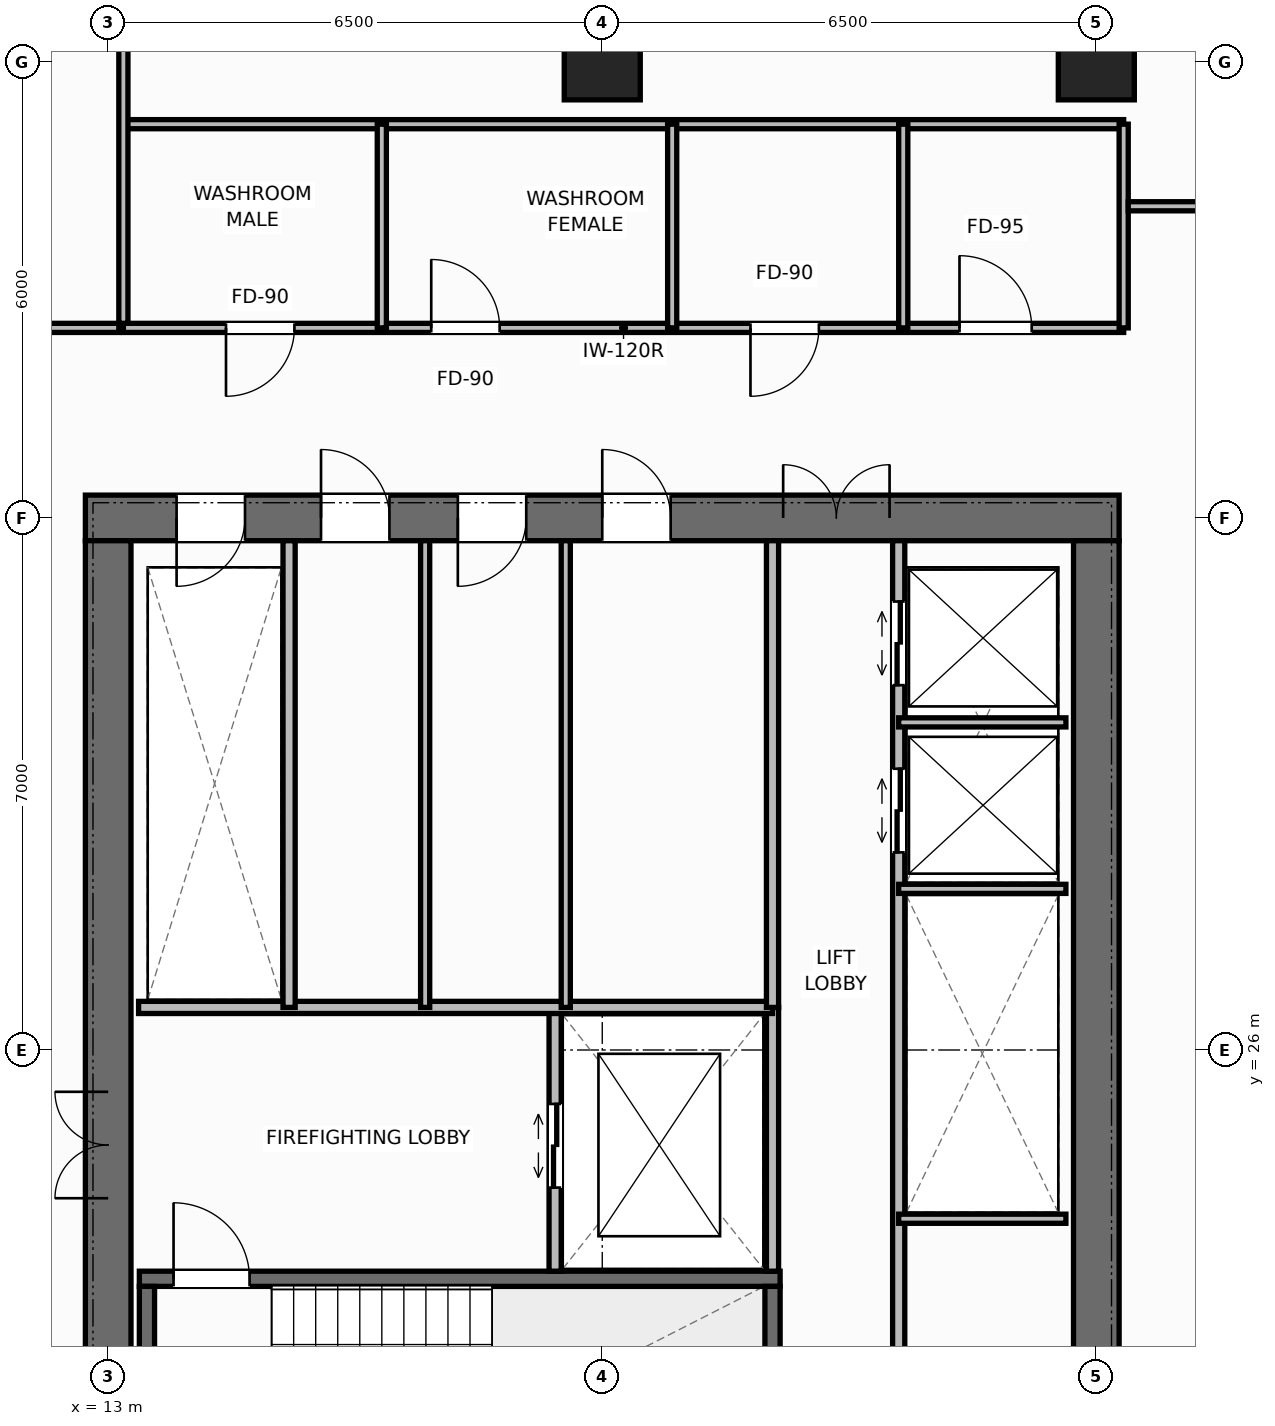
"""IFC4 building model, lengths in metres.
Left out: names, types, materials, properties, quantities, classifications, styles, units other than length and angle.
Written with IfcOpenShell. Run it as: python <this file> out.ifc"""

import sys

from ifc_helpers import new_model, si_unit, direction, frame, frame_2d, origin, origin_2d, place, context, subcontext, project, spatial, rectangle, extrude, element, fill, save


model = new_model("IFC4")
c1 = context("Model", 3, precision=1e-05, world=origin(), true_north=direction((0.0, 1.0)))
c2 = subcontext(c1, "Body", "Model", "MODEL_VIEW")
j1 = project(units=[si_unit("LENGTHUNIT", "METRE"), si_unit("PLANEANGLEUNIT", "RADIAN")], contexts=[c1])
p1 = place(None, origin())
s1 = spatial("IfcSite", under=j1, at=p1, CompositionType="ELEMENT")
p2 = place(p1, origin())
s2 = spatial("IfcBuilding", under=s1, at=p2, CompositionType="ELEMENT")
p3 = place(p2, frame((0.0, 0.0, 148.0)))
s3 = spatial("IfcBuildingStorey", under=s2, at=p3, CompositionType="ELEMENT", Elevation=148.0)
p4 = place(p3, frame((12.7, 33.0, 0.0), z_axis=(0.0, 0.0, 1.0), x_axis=(1.0, 0.0, 0.0)))
e1 = element("IfcWall", 1, at=p4, inside=s3, PredefinedType="SHEAR", context=c2, shape_type="SweptSolid", body=[
    extrude(rectangle(XDim=13.6, YDim=0.6, at=frame_2d((6.8, 0.0))), origin(), (0.0, 0.0, 1.0), 3.8),
])
p5 = place(p4, frame((1.2, 0.0, 0.0)))
e2 = element("IfcOpeningElement", 2, at=p5, cuts=e1, PredefinedType="OPENING", context=c2, shape_type="SweptSolid", body=[
    extrude(rectangle(XDim=0.9, YDim=2.15, at=frame_2d((0.45, 1.075))), frame((0.0, 0.31, 0.0), z_axis=(0.0, -1.0, 0.0), x_axis=(1.0, 0.0, 0.0)), (0.0, 0.0, 1.0), 0.62),
])
p6 = place(p4, frame((3.1, 0.0, 0.0)))
e3 = element("IfcOpeningElement", 3, at=p6, cuts=e1, PredefinedType="OPENING", context=c2, shape_type="SweptSolid", body=[
    extrude(rectangle(XDim=0.9, YDim=2.15, at=frame_2d((0.45, 1.075))), frame((0.0, 0.31, 0.0), z_axis=(0.0, -1.0, 0.0), x_axis=(1.0, 0.0, 0.0)), (0.0, 0.0, 1.0), 0.62),
])
p7 = place(p4, frame((4.9, 0.0, 0.0)))
e4 = element("IfcOpeningElement", 4, at=p7, cuts=e1, PredefinedType="OPENING", context=c2, shape_type="SweptSolid", body=[
    extrude(rectangle(XDim=0.9, YDim=2.15, at=frame_2d((0.45, 1.075))), frame((0.0, 0.31, 0.0), z_axis=(0.0, -1.0, 0.0), x_axis=(1.0, 0.0, 0.0)), (0.0, 0.0, 1.0), 0.62),
])
p8 = place(p4, frame((6.8, 0.0, 0.0)))
e5 = element("IfcOpeningElement", 5, at=p8, cuts=e1, PredefinedType="OPENING", context=c2, shape_type="SweptSolid", body=[
    extrude(rectangle(XDim=0.9, YDim=2.15, at=frame_2d((0.45, 1.075))), frame((0.0, 0.31, 0.0), z_axis=(0.0, -1.0, 0.0), x_axis=(1.0, 0.0, 0.0)), (0.0, 0.0, 1.0), 0.62),
])
p9 = place(p4, frame((9.18, 0.0, 0.0)))
e6 = element("IfcOpeningElement", 6, at=p9, cuts=e1, PredefinedType="OPENING", context=c2, shape_type="SweptSolid", body=[
    extrude(rectangle(XDim=1.4, YDim=2.2, at=frame_2d((0.7, 1.1))), frame((0.0, 0.31, 0.0), z_axis=(0.0, -1.0, 0.0), x_axis=(1.0, 0.0, 0.0)), (0.0, 0.0, 1.0), 0.62),
])
p10 = place(p3, frame((13.0, 19.3, 0.0), z_axis=(0.0, 0.0, 1.0), x_axis=(0.0, 1.0, 0.0)))
e7 = element("IfcWall", 7, at=p10, inside=s3, PredefinedType="SHEAR", context=c2, shape_type="SweptSolid", body=[
    extrude(rectangle(XDim=13.4, YDim=0.6, at=frame_2d((6.7, 0.0))), origin(), (0.0, 0.0, 1.0), 3.8),
])
p11 = place(p10, frame((4.75, 0.0, 0.0)))
e8 = element("IfcOpeningElement", 8, at=p11, cuts=e7, PredefinedType="OPENING", context=c2, shape_type="SweptSolid", body=[
    extrude(rectangle(XDim=1.4, YDim=2.2, at=frame_2d((0.7, 1.1))), frame((0.0, 0.31, 0.0), z_axis=(0.0, -1.0, 0.0), x_axis=(1.0, 0.0, 0.0)), (0.0, 0.0, 1.0), 0.62),
])
p12 = place(p3, frame((26.0, 19.3, 0.0), z_axis=(0.0, 0.0, 1.0), x_axis=(0.0, 1.0, 0.0)))
e9 = element("IfcWall", 9, at=p12, inside=s3, PredefinedType="SHEAR", context=c2, shape_type="SweptSolid", body=[
    extrude(rectangle(XDim=13.4, YDim=0.6, at=frame_2d((6.7, 0.0))), origin(), (0.0, 0.0, 1.0), 3.8),
])
p13 = place(p3, frame((13.41, 22.99, 0.0), z_axis=(0.0, 0.0, 1.0), x_axis=(1.0, 0.0, 0.0)))
e10 = element("IfcWall", 10, at=p13, inside=s3, PredefinedType="SHEAR", context=c2, shape_type="SweptSolid", body=[
    extrude(rectangle(XDim=8.43, YDim=0.2, at=frame_2d((4.215, 0.0))), origin(), (0.0, 0.0, 1.0), 3.8),
])
p14 = place(p13, frame((0.45, 0.0, 0.0)))
e11 = element("IfcOpeningElement", 11, at=p14, cuts=e10, PredefinedType="OPENING", context=c2, shape_type="SweptSolid", body=[
    extrude(rectangle(XDim=1.0, YDim=2.15, at=frame_2d((0.5, 1.075))), frame((0.0, 0.11, 0.0), z_axis=(0.0, -1.0, 0.0), x_axis=(1.0, 0.0, 0.0)), (0.0, 0.0, 1.0), 0.22),
])
for number, where, z_axis, x_axis in (
    (12, (13.51, 19.61, 0.0), (0.0, 0.0, 1.0), (0.0, 1.0, 0.0)),
    (13, (21.74, 19.61, 0.0), (0.0, 0.0, 1.0), (0.0, 1.0, 0.0)),
):
    element("IfcWall", number, at=place(p3, frame(where, z_axis=z_axis, x_axis=x_axis)), inside=s3, PredefinedType="SHEAR", context=c2, shape_type="SweptSolid", body=[
        extrude(rectangle(XDim=3.28, YDim=0.2, at=frame_2d((1.64, 0.0))), origin(), (0.0, 0.0, 1.0), 3.8),
    ])
for number, where, z_axis, x_axis in (
    (14, (19.5, 39.0, 0.0), (0.0, 0.0, 1.0), (1.0, 0.0, 0.0)),
    (15, (26.0, 39.0, 0.0), (0.0, 0.0, 1.0), (1.0, 0.0, 0.0)),
):
    element("IfcColumn", number, at=place(p3, frame(where, z_axis=z_axis, x_axis=x_axis)), inside=s3, PredefinedType="COLUMN", context=c2, shape_type="SweptSolid", body=[
        extrude(rectangle(XDim=1.0, YDim=1.0, at=origin_2d()), origin(), (0.0, 0.0, 1.0), 3.8),
    ])
p15 = place(p3, frame((21.74, 23.09, 0.0), z_axis=(0.0, 0.0, 1.0), x_axis=(0.0, 1.0, 0.0)))
e16 = element("IfcWall", 16, at=p15, inside=s3, PredefinedType="STANDARD", context=c2, shape_type="SweptSolid", body=[
    extrude(rectangle(XDim=3.47, YDim=0.16, at=frame_2d((1.735, 0.0))), origin(), (0.0, 0.0, 1.0), 3.572),
])
p16 = place(p3, frame((18.88, 23.09, 0.0), z_axis=(0.0, 0.0, 1.0), x_axis=(0.0, 1.0, 0.0)))
e17 = element("IfcWall", 17, at=p16, inside=s3, PredefinedType="STANDARD", context=c2, shape_type="SweptSolid", body=[
    extrude(rectangle(XDim=3.47, YDim=0.16, at=frame_2d((1.735, 0.0))), origin(), (0.0, 0.0, 1.0), 3.572),
])
p17 = place(p16, frame((1.1, 0.0, 0.0)))
e18 = element("IfcOpeningElement", 18, at=p17, cuts=e17, PredefinedType="OPENING", context=c2, shape_type="SweptSolid", body=[
    extrude(rectangle(XDim=1.1, YDim=2.2, at=frame_2d((0.55, 1.1))), frame((0.0, 0.09, 0.0), z_axis=(0.0, -1.0, 0.0), x_axis=(1.0, 0.0, 0.0)), (0.0, 0.0, 1.0), 0.18),
])
p18 = place(p3, frame((13.4, 26.56, 0.0), z_axis=(0.0, 0.0, 1.0), x_axis=(1.0, 0.0, 0.0)))
e19 = element("IfcWall", 19, at=p18, inside=s3, PredefinedType="STANDARD", context=c2, shape_type="SweptSolid", body=[
    extrude(rectangle(XDim=8.34, YDim=0.16, at=frame_2d((4.17, 0.0))), origin(), (0.0, 0.0, 1.0), 3.572),
])
p19 = place(p3, frame((15.38, 26.56, 0.0), z_axis=(0.0, 0.0, 1.0), x_axis=(0.0, 1.0, 0.0)))
e20 = element("IfcWall", 20, at=p19, inside=s3, PredefinedType="STANDARD", context=c2, shape_type="SweptSolid", body=[
    extrude(rectangle(XDim=6.14, YDim=0.16, at=frame_2d((3.07, 0.0))), origin(), (0.0, 0.0, 1.0), 3.572),
])
for number, where, z_axis, x_axis in (
    (21, (17.17, 26.56, 0.0), (0.0, 0.0, 1.0), (0.0, 1.0, 0.0)),
    (22, (19.02, 26.56, 0.0), (0.0, 0.0, 1.0), (0.0, 1.0, 0.0)),
):
    element("IfcWall", number, at=place(p3, frame(where, z_axis=z_axis, x_axis=x_axis)), inside=s3, PredefinedType="PARTITIONING", context=c2, shape_type="SweptSolid", body=[
        extrude(rectangle(XDim=6.14, YDim=0.12, at=frame_2d((3.07, 0.0))), origin(), (0.0, 0.0, 1.0), 3.572),
    ])
p20 = place(p3, frame((21.74, 26.56, 0.0), z_axis=(0.0, 0.0, 1.0), x_axis=(0.0, 1.0, 0.0)))
e23 = element("IfcWall", 23, at=p20, inside=s3, PredefinedType="STANDARD", context=c2, shape_type="SweptSolid", body=[
    extrude(rectangle(XDim=6.14, YDim=0.16, at=frame_2d((3.07, 0.0))), origin(), (0.0, 0.0, 1.0), 3.572),
])
p21 = place(p3, frame((23.4, 19.3, 0.0), z_axis=(0.0, 0.0, 1.0), x_axis=(0.0, 1.0, 0.0)))
e24 = element("IfcWall", 24, at=p21, inside=s3, PredefinedType="STANDARD", context=c2, shape_type="SweptSolid", body=[
    extrude(rectangle(XDim=13.4, YDim=0.16, at=frame_2d((6.7, 0.0))), origin(), (0.0, 0.0, 1.0), 3.572),
])
p22 = place(p21, frame((1.7, 0.0, 0.0)))
e25 = element("IfcOpeningElement", 25, at=p22, cuts=e24, PredefinedType="OPENING", context=c2, shape_type="SweptSolid", body=[
    extrude(rectangle(XDim=0.95, YDim=2.15, at=frame_2d((0.475, 1.075))), frame((0.0, 0.09, 0.0), z_axis=(0.0, -1.0, 0.0), x_axis=(1.0, 0.0, 0.0)), (0.0, 0.0, 1.0), 0.18),
])
p23 = place(p21, frame((9.3, 0.0, 0.0)))
e26 = element("IfcOpeningElement", 26, at=p23, cuts=e24, PredefinedType="OPENING", context=c2, shape_type="SweptSolid", body=[
    extrude(rectangle(XDim=1.1, YDim=2.2, at=frame_2d((0.55, 1.1))), frame((0.0, 0.09, 0.0), z_axis=(0.0, -1.0, 0.0), x_axis=(1.0, 0.0, 0.0)), (0.0, 0.0, 1.0), 0.18),
])
p24 = place(p21, frame((11.5, 0.0, 0.0)))
e27 = element("IfcOpeningElement", 27, at=p24, cuts=e24, PredefinedType="OPENING", context=c2, shape_type="SweptSolid", body=[
    extrude(rectangle(XDim=1.1, YDim=2.2, at=frame_2d((0.55, 1.1))), frame((0.0, 0.09, 0.0), z_axis=(0.0, -1.0, 0.0), x_axis=(1.0, 0.0, 0.0)), (0.0, 0.0, 1.0), 0.18),
])
for number, where, z_axis, x_axis in (
    (28, (23.4, 23.78, 0.0), (0.0, 0.0, 1.0), (1.0, 0.0, 0.0)),
    (29, (23.4, 28.12, 0.0), (0.0, 0.0, 1.0), (1.0, 0.0, 0.0)),
    (30, (23.4, 30.31, 0.0), (0.0, 0.0, 1.0), (1.0, 0.0, 0.0)),
):
    element("IfcWall", number, at=place(p3, frame(where, z_axis=z_axis, x_axis=x_axis)), inside=s3, PredefinedType="PARTITIONING", context=c2, shape_type="SweptSolid", body=[
        extrude(rectangle(XDim=2.2, YDim=0.12, at=frame_2d((1.1, 0.0))), origin(), (0.0, 0.0, 1.0), 3.572),
    ])
p25 = place(p3, frame((13.2, 35.5, 0.0), z_axis=(0.0, 0.0, 1.0), x_axis=(1.0, 0.0, 0.0)))
e31 = element("IfcWall", 31, at=p25, inside=s3, PredefinedType="PARTITIONING", context=c2, shape_type="SweptSolid", body=[
    extrude(rectangle(XDim=13.16, YDim=0.12, at=frame_2d((6.58, 0.0))), origin(), (0.0, 0.0, 1.0), 3.572),
])
p26 = place(p25, frame((1.35, 0.0, 0.0)))
e32 = element("IfcOpeningElement", 32, at=p26, cuts=e31, PredefinedType="OPENING", context=c2, shape_type="SweptSolid", body=[
    extrude(rectangle(XDim=0.9, YDim=2.15, at=frame_2d((0.45, 1.075))), frame((0.0, 0.07, 0.0), z_axis=(0.0, -1.0, 0.0), x_axis=(1.0, 0.0, 0.0)), (0.0, 0.0, 1.0), 0.14),
])
p27 = place(p25, frame((4.05, 0.0, 0.0)))
e33 = element("IfcOpeningElement", 33, at=p27, cuts=e31, PredefinedType="OPENING", context=c2, shape_type="SweptSolid", body=[
    extrude(rectangle(XDim=0.9, YDim=2.15, at=frame_2d((0.45, 1.075))), frame((0.0, 0.07, 0.0), z_axis=(0.0, -1.0, 0.0), x_axis=(1.0, 0.0, 0.0)), (0.0, 0.0, 1.0), 0.14),
])
p28 = place(p25, frame((8.25, 0.0, 0.0)))
e34 = element("IfcOpeningElement", 34, at=p28, cuts=e31, PredefinedType="OPENING", context=c2, shape_type="SweptSolid", body=[
    extrude(rectangle(XDim=0.9, YDim=2.15, at=frame_2d((0.45, 1.075))), frame((0.0, 0.07, 0.0), z_axis=(0.0, -1.0, 0.0), x_axis=(1.0, 0.0, 0.0)), (0.0, 0.0, 1.0), 0.14),
])
p29 = place(p25, frame((11.0, 0.0, 0.0)))
e35 = element("IfcOpeningElement", 35, at=p29, cuts=e31, PredefinedType="OPENING", context=c2, shape_type="SweptSolid", body=[
    extrude(rectangle(XDim=0.95, YDim=2.15, at=frame_2d((0.475, 1.075))), frame((0.0, 0.07, 0.0), z_axis=(0.0, -1.0, 0.0), x_axis=(1.0, 0.0, 0.0)), (0.0, 0.0, 1.0), 0.14),
])
p30 = place(p3, frame((13.2, 38.18, 0.0), z_axis=(0.0, 0.0, 1.0), x_axis=(1.0, 0.0, 0.0)))
e36 = element("IfcWall", 36, at=p30, inside=s3, PredefinedType="PARTITIONING", context=c2, shape_type="SweptSolid", body=[
    extrude(rectangle(XDim=13.16, YDim=0.12, at=frame_2d((6.58, 0.0))), origin(), (0.0, 0.0, 1.0), 3.572),
])
for number, where, z_axis, x_axis in (
    (37, (16.6, 35.5, 0.0), (0.0, 0.0, 1.0), (0.0, 1.0, 0.0)),
    (38, (20.42, 35.5, 0.0), (0.0, 0.0, 1.0), (0.0, 1.0, 0.0)),
    (39, (23.46, 35.5, 0.0), (0.0, 0.0, 1.0), (0.0, 1.0, 0.0)),
    (40, (26.36, 35.5, 0.0), (0.0, 0.0, 1.0), (0.0, 1.0, 0.0)),
):
    element("IfcWall", number, at=place(p3, frame(where, z_axis=z_axis, x_axis=x_axis)), inside=s3, PredefinedType="PARTITIONING", context=c2, shape_type="SweptSolid", body=[
        extrude(rectangle(XDim=2.68, YDim=0.12, at=frame_2d((1.34, 0.0))), origin(), (0.0, 0.0, 1.0), 3.572),
    ])
p31 = place(p3, frame((13.2, 35.56, 0.0), z_axis=(0.0, 0.0, 1.0), x_axis=(0.0, 1.0, 0.0)))
e41 = element("IfcWall", 41, at=p31, inside=s3, PredefinedType="PARTITIONING", context=c2, shape_type="SweptSolid", body=[
    extrude(rectangle(XDim=13.02, YDim=0.12, at=frame_2d((6.51, 0.0))), origin(), (0.0, 0.0, 1.0), 3.022),
])
p32 = place(p3, frame((3.98, 35.5, 0.0), z_axis=(0.0, 0.0, 1.0), x_axis=(1.0, 0.0, 0.0)))
e42 = element("IfcWall", 42, at=p32, inside=s3, PredefinedType="PARTITIONING", context=c2, shape_type="SweptSolid", body=[
    extrude(rectangle(XDim=9.16, YDim=0.12, at=frame_2d((4.58, 0.0))), origin(), (0.0, 0.0, 1.0), 3.572),
])
p33 = place(p32, frame((6.9, 0.0, 0.0)))
e43 = element("IfcOpeningElement", 43, at=p33, cuts=e42, PredefinedType="OPENING", context=c2, shape_type="SweptSolid", body=[
    extrude(rectangle(XDim=0.95, YDim=2.15, at=frame_2d((0.475, 1.075))), frame((0.0, 0.07, 0.0), z_axis=(0.0, -1.0, 0.0), x_axis=(1.0, 0.0, 0.0)), (0.0, 0.0, 1.0), 0.14),
])
p34 = place(p3, frame((26.42, 37.1, 0.0), z_axis=(0.0, 0.0, 1.0), x_axis=(1.0, 0.0, 0.0)))
e44 = element("IfcWall", 44, at=p34, inside=s3, PredefinedType="PARTITIONING", context=c2, shape_type="SweptSolid", body=[
    extrude(rectangle(XDim=12.72, YDim=0.12, at=frame_2d((6.36, 0.0))), origin(), (0.0, 0.0, 1.0), 3.572),
])
p35 = place(p34, frame((3.816, 0.0, 0.0)))
e45 = element("IfcOpeningElement", 45, at=p35, cuts=e44, PredefinedType="OPENING", context=c2, shape_type="SweptSolid", body=[
    extrude(rectangle(XDim=0.95, YDim=2.15, at=frame_2d((0.475, 1.075))), frame((0.0, 0.07, 0.0), z_axis=(0.0, -1.0, 0.0), x_axis=(1.0, 0.0, 0.0)), (0.0, 0.0, 1.0), 0.14),
])
p36 = place(p14, origin())
e46 = element("IfcDoor", 46, at=p36, inside=s3, OperationType="SINGLE_SWING_LEFT", PredefinedType="DOOR", context=c2, shape_type="SweptSolid", body=[
    extrude(rectangle(XDim=1.0, YDim=2.15, at=frame_2d((0.5, 1.075))), frame((0.0, 0.025, 0.0), z_axis=(0.0, -1.0, 0.0), x_axis=(1.0, 0.0, 0.0)), (0.0, 0.0, 1.0), 0.05),
])
fill(e11, e46)
p37 = place(p11, origin())
e47 = element("IfcDoor", 47, at=p37, inside=s3, OperationType="DOUBLE_DOOR_SINGLE_SWING", PredefinedType="DOOR", context=c2, shape_type="SweptSolid", body=[
    extrude(rectangle(XDim=1.4, YDim=2.2, at=frame_2d((0.7, 1.1))), frame((0.0, 0.025, 0.0), z_axis=(0.0, -1.0, 0.0), x_axis=(1.0, 0.0, 0.0)), (0.0, 0.0, 1.0), 0.05),
])
fill(e8, e47)
p38 = place(p17, origin())
e48 = element("IfcDoor", 48, at=p38, inside=s3, OperationType="DOUBLE_DOOR_SLIDING", PredefinedType="DOOR", context=c2, shape_type="SweptSolid", body=[
    extrude(rectangle(XDim=1.1, YDim=2.2, at=frame_2d((0.55, 1.1))), frame((0.0, 0.025, 0.0), z_axis=(0.0, -1.0, 0.0), x_axis=(1.0, 0.0, 0.0)), (0.0, 0.0, 1.0), 0.05),
])
fill(e18, e48)
p39 = place(p5, origin())
e49 = element("IfcDoor", 49, at=p39, inside=s3, OperationType="SINGLE_SWING_RIGHT", PredefinedType="DOOR", context=c2, shape_type="SweptSolid", body=[
    extrude(rectangle(XDim=0.9, YDim=2.15, at=frame_2d((0.45, 1.075))), frame((0.0, -0.025, 0.0), z_axis=(0.0, -1.0, 0.0), x_axis=(1.0, 0.0, 0.0)), (0.0, 0.0, 1.0), 0.05),
])
fill(e2, e49)
p40 = place(p6, origin())
e50 = element("IfcDoor", 50, at=p40, inside=s3, OperationType="SINGLE_SWING_LEFT", PredefinedType="DOOR", context=c2, shape_type="SweptSolid", body=[
    extrude(rectangle(XDim=0.9, YDim=2.15, at=frame_2d((0.45, 1.075))), frame((0.0, -0.025, 0.0), z_axis=(0.0, -1.0, 0.0), x_axis=(1.0, 0.0, 0.0)), (0.0, 0.0, 1.0), 0.05),
])
fill(e3, e50)
p41 = place(p7, origin())
e51 = element("IfcDoor", 51, at=p41, inside=s3, OperationType="SINGLE_SWING_RIGHT", PredefinedType="DOOR", context=c2, shape_type="SweptSolid", body=[
    extrude(rectangle(XDim=0.9, YDim=2.15, at=frame_2d((0.45, 1.075))), frame((0.0, -0.025, 0.0), z_axis=(0.0, -1.0, 0.0), x_axis=(1.0, 0.0, 0.0)), (0.0, 0.0, 1.0), 0.05),
])
fill(e4, e51)
p42 = place(p8, origin())
e52 = element("IfcDoor", 52, at=p42, inside=s3, OperationType="SINGLE_SWING_LEFT", PredefinedType="DOOR", context=c2, shape_type="SweptSolid", body=[
    extrude(rectangle(XDim=0.9, YDim=2.15, at=frame_2d((0.45, 1.075))), frame((0.0, -0.025, 0.0), z_axis=(0.0, -1.0, 0.0), x_axis=(1.0, 0.0, 0.0)), (0.0, 0.0, 1.0), 0.05),
])
fill(e5, e52)
p43 = place(p9, origin())
e53 = element("IfcDoor", 53, at=p43, inside=s3, OperationType="DOUBLE_DOOR_SINGLE_SWING", PredefinedType="DOOR", context=c2, shape_type="SweptSolid", body=[
    extrude(rectangle(XDim=1.4, YDim=2.2, at=frame_2d((0.7, 1.1))), frame((0.0, -0.025, 0.0), z_axis=(0.0, -1.0, 0.0), x_axis=(1.0, 0.0, 0.0)), (0.0, 0.0, 1.0), 0.05),
])
fill(e6, e53)
p44 = place(p23, origin())
e54 = element("IfcDoor", 54, at=p44, inside=s3, OperationType="DOUBLE_DOOR_SLIDING", PredefinedType="DOOR", context=c2, shape_type="SweptSolid", body=[
    extrude(rectangle(XDim=1.1, YDim=2.2, at=frame_2d((0.55, 1.1))), frame((0.0, 0.025, 0.0), z_axis=(0.0, -1.0, 0.0), x_axis=(1.0, 0.0, 0.0)), (0.0, 0.0, 1.0), 0.05),
])
fill(e26, e54)
p45 = place(p24, origin())
e55 = element("IfcDoor", 55, at=p45, inside=s3, OperationType="DOUBLE_DOOR_SLIDING", PredefinedType="DOOR", context=c2, shape_type="SweptSolid", body=[
    extrude(rectangle(XDim=1.1, YDim=2.2, at=frame_2d((0.55, 1.1))), frame((0.0, 0.025, 0.0), z_axis=(0.0, -1.0, 0.0), x_axis=(1.0, 0.0, 0.0)), (0.0, 0.0, 1.0), 0.05),
])
fill(e27, e55)
p46 = place(p26, origin())
e56 = element("IfcDoor", 56, at=p46, inside=s3, OperationType="SINGLE_SWING_RIGHT", PredefinedType="DOOR", context=c2, shape_type="SweptSolid", body=[
    extrude(rectangle(XDim=0.9, YDim=2.15, at=frame_2d((0.45, 1.075))), frame((0.0, 0.025, 0.0), z_axis=(0.0, -1.0, 0.0), x_axis=(1.0, 0.0, 0.0)), (0.0, 0.0, 1.0), 0.05),
])
fill(e32, e56)
p47 = place(p27, origin())
e57 = element("IfcDoor", 57, at=p47, inside=s3, OperationType="SINGLE_SWING_LEFT", PredefinedType="DOOR", context=c2, shape_type="SweptSolid", body=[
    extrude(rectangle(XDim=0.9, YDim=2.15, at=frame_2d((0.45, 1.075))), frame((0.0, 0.025, 0.0), z_axis=(0.0, -1.0, 0.0), x_axis=(1.0, 0.0, 0.0)), (0.0, 0.0, 1.0), 0.05),
])
fill(e33, e57)
p48 = place(p28, origin())
e58 = element("IfcDoor", 58, at=p48, inside=s3, OperationType="SINGLE_SWING_RIGHT", PredefinedType="DOOR", context=c2, shape_type="SweptSolid", body=[
    extrude(rectangle(XDim=0.9, YDim=2.15, at=frame_2d((0.45, 1.075))), frame((0.0, 0.025, 0.0), z_axis=(0.0, -1.0, 0.0), x_axis=(1.0, 0.0, 0.0)), (0.0, 0.0, 1.0), 0.05),
])
fill(e34, e58)
p49 = place(p29, origin())
e59 = element("IfcDoor", 59, at=p49, inside=s3, OperationType="SINGLE_SWING_LEFT", PredefinedType="DOOR", context=c2, shape_type="SweptSolid", body=[
    extrude(rectangle(XDim=0.95, YDim=2.15, at=frame_2d((0.475, 1.075))), frame((0.0, 0.025, 0.0), z_axis=(0.0, -1.0, 0.0), x_axis=(1.0, 0.0, 0.0)), (0.0, 0.0, 1.0), 0.05),
])
fill(e35, e59)
save(model, sys.argv[1])
